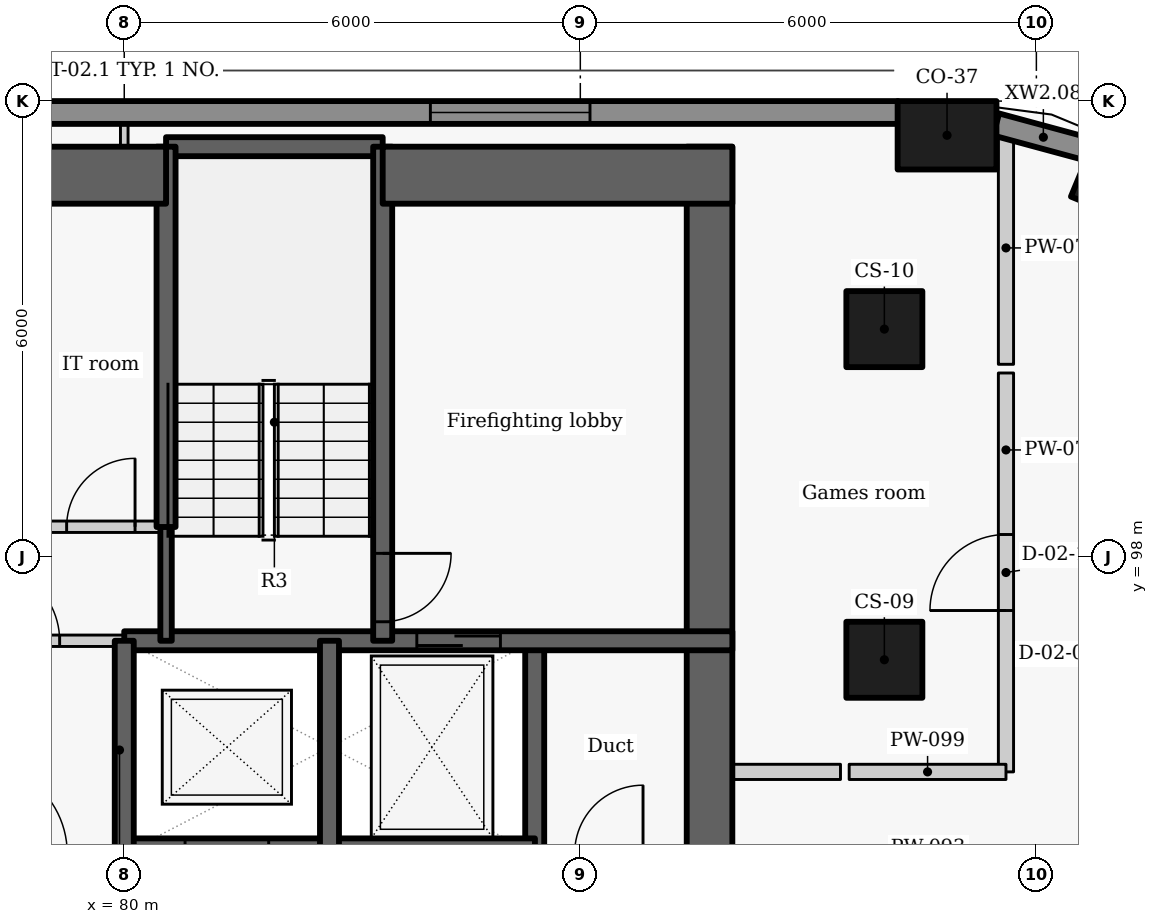
"""IFC4 building model, lengths in metres.
Left out: names, types, materials, properties, quantities, classifications, styles, units other than length and angle.
Written with IfcOpenShell. Run it as: python <this file> out.ifc"""

import sys

from ifc_helpers import new_model, si_unit, direction, frame, frame_2d, origin, origin_2d, place, context, subcontext, project, spatial, rectangle, extrude, element, fill, save


model = new_model("IFC4")
c1 = context("Model", 3, precision=1e-05, world=origin(), true_north=direction((0.0, 1.0)))
c2 = subcontext(c1, "Body", "Model", "MODEL_VIEW")
j1 = project(units=[si_unit("LENGTHUNIT", "METRE"), si_unit("PLANEANGLEUNIT", "RADIAN")], contexts=[c1])
p1 = place(None, origin())
s1 = spatial("IfcSite", under=j1, at=p1, CompositionType="ELEMENT")
p2 = place(p1, origin())
s2 = spatial("IfcBuilding", under=s1, at=p2, CompositionType="ELEMENT")
p3 = place(p2, frame((0.0, 0.0, 140.4)))
s3 = spatial("IfcBuildingStorey", under=s2, at=p3, CompositionType="ELEMENT", Elevation=140.4)
for number, where, z_axis, x_axis in (
    (1, (93.227, 102.91, 0.0), (0.0, 0.0, 1.0), (-0.924, 0.383, 0.0)),
    (2, (90.825, 103.55, 0.0), (0.0, 0.0, 1.0), (-1.0, 0.0, 0.0)),
):
    element("IfcColumn", number, at=place(p3, frame(where, z_axis=z_axis, x_axis=x_axis)), inside=s3, PredefinedType="COLUMN", context=c2, shape_type="SweptSolid", body=[
        extrude(rectangle(XDim=1.3, YDim=0.9, at=origin_2d()), origin(), (0.0, 0.0, 1.0), 3.3),
    ])
for number, where, z_axis, x_axis in (
    (3, (90.0, 96.65, 0.0), (0.0, 0.0, 1.0), (0.0, 1.0, 0.0)),
    (4, (90.0, 101.0, 0.0), (0.0, 0.0, 1.0), (0.0, 1.0, 0.0)),
):
    element("IfcColumn", number, at=place(p3, frame(where, z_axis=z_axis, x_axis=x_axis)), inside=s3, PredefinedType="COLUMN", context=c2, shape_type="SweptSolid", body=[
        extrude(rectangle(XDim=1.0, YDim=1.0, at=origin_2d()), origin(), (0.0, 0.0, 1.0), 3.3),
    ])
p4 = place(p3, frame((92.713, 103.356, 0.0), z_axis=(0.0, 0.0, 1.0), x_axis=(-0.965274225809, 0.26123872031, 0.0)))
e5 = element("IfcWall", 5, at=p4, inside=s3, PredefinedType="SOLIDWALL", context=c2, shape_type="SweptSolid", body=[
    extrude(rectangle(XDim=1.287, YDim=0.3, at=frame_2d((0.644, 0.0))), origin(), (0.0, 0.0, 1.0), 2.425),
])
p5 = place(p3, frame((90.179, 103.85, 0.0), z_axis=(0.0, 0.0, 1.0), x_axis=(-1.0, 0.0, 0.0)))
e6 = element("IfcWall", 6, at=p5, inside=s3, PredefinedType="SOLIDWALL", context=c2, shape_type="SweptSolid", body=[
    extrude(rectangle(XDim=20.391, YDim=0.3, at=frame_2d((10.196, 0.0))), origin(), (0.0, 0.0, 1.0), 2.425),
])
p6 = place(p5, frame((4.051, 0.0, 0.9)))
e7 = element("IfcOpeningElement", 7, at=p6, cuts=e6, PredefinedType="OPENING", context=c2, shape_type="SweptSolid", body=[
    extrude(rectangle(XDim=2.1, YDim=1.1, at=frame_2d((1.05, 0.55))), frame((0.0, 0.16, 0.0), z_axis=(0.0, -1.0, 0.0), x_axis=(1.0, 0.0, 0.0)), (0.0, 0.0, 1.0), 0.32),
])
p7 = place(p5, frame((14.212, 0.0, 0.9)))
e8 = element("IfcOpeningElement", 8, at=p7, cuts=e6, PredefinedType="OPENING", context=c2, shape_type="SweptSolid", body=[
    extrude(rectangle(XDim=2.1, YDim=1.1, at=frame_2d((1.05, 0.55))), frame((0.0, 0.16, 0.0), z_axis=(0.0, -1.0, 0.0), x_axis=(1.0, 0.0, 0.0)), (0.0, 0.0, 1.0), 0.32),
])
p8 = place(p3, frame((85.4, 94.1, -0.275), z_axis=(0.0, 0.0, 1.0), x_axis=(0.0, 1.0, 0.0)))
e9 = element("IfcWall", 9, at=p8, inside=s3, PredefinedType="SHEAR", context=c2, shape_type="SweptSolid", body=[
    extrude(rectangle(XDim=2.8, YDim=0.25, at=frame_2d((1.4, 0.0))), origin(), (0.0, 0.0, 1.0), 3.3),
])
p9 = place(p3, frame((87.7, 103.4, -0.275), z_axis=(0.0, 0.0, 1.0), x_axis=(0.0, -1.0, 0.0)))
e10 = element("IfcWall", 10, at=p9, inside=s3, PredefinedType="SHEAR", context=c2, shape_type="SweptSolid", body=[
    extrude(rectangle(XDim=15.6, YDim=0.6, at=frame_2d((7.8, 0.0))), origin(), (0.0, 0.0, 1.0), 3.3),
])
p10 = place(p9, frame((10.248, 0.0, 0.275)))
e11 = element("IfcOpeningElement", 11, at=p10, cuts=e10, PredefinedType="OPENING", context=c2, shape_type="SweptSolid", body=[
    extrude(rectangle(XDim=1.5, YDim=2.1, at=frame_2d((0.75, 1.05))), frame((0.0, 0.31, 0.0), z_axis=(0.0, -1.0, 0.0), x_axis=(1.0, 0.0, 0.0)), (0.0, 0.0, 1.0), 0.62),
])
p11 = place(p3, frame((79.997, 94.1, -0.275), z_axis=(0.0, 0.0, 1.0), x_axis=(1.0, 0.0, 0.0)))
e12 = element("IfcWall", 12, at=p11, inside=s3, PredefinedType="SHEAR", context=c2, shape_type="SweptSolid", body=[
    extrude(rectangle(XDim=5.406, YDim=0.4, at=frame_2d((2.703, 0.0))), origin(), (0.0, 0.0, 1.0), 3.3),
])
p12 = place(p11, frame((0.803, 0.0, 0.275)))
e13 = element("IfcOpeningElement", 13, at=p12, cuts=e12, PredefinedType="OPENING", context=c2, shape_type="SweptSolid", body=[
    extrude(rectangle(XDim=1.1, YDim=2.1, at=frame_2d((0.55, 1.05))), frame((0.0, 0.21, 0.0), z_axis=(0.0, -1.0, 0.0), x_axis=(1.0, 0.0, 0.0)), (0.0, 0.0, 1.0), 0.42),
])
p13 = place(p3, frame((80.0, 96.9, -0.275), z_axis=(0.0, 0.0, 1.0), x_axis=(1.0, 0.0, 0.0)))
e14 = element("IfcWall", 14, at=p13, inside=s3, PredefinedType="SHEAR", context=c2, shape_type="SweptSolid", body=[
    extrude(rectangle(XDim=8.0, YDim=0.25, at=frame_2d((4.0, 0.0))), origin(), (0.0, 0.0, 1.0), 3.3),
])
p14 = place(p13, frame((3.849, 0.0, 0.275)))
e15 = element("IfcOpeningElement", 15, at=p14, cuts=e14, PredefinedType="OPENING", context=c2, shape_type="SweptSolid", body=[
    extrude(rectangle(XDim=1.1, YDim=2.1, at=frame_2d((0.55, 1.05))), frame((0.0, 0.135, 0.0), z_axis=(0.0, -1.0, 0.0), x_axis=(1.0, 0.0, 0.0)), (0.0, 0.0, 1.0), 0.27),
])
p15 = place(p3, frame((80.0, 94.1, -0.275), z_axis=(0.0, 0.0, 1.0), x_axis=(0.0, 1.0, 0.0)))
e16 = element("IfcWall", 16, at=p15, inside=s3, PredefinedType="SHEAR", context=c2, shape_type="SweptSolid", body=[
    extrude(rectangle(XDim=2.8, YDim=0.25, at=frame_2d((1.4, 0.0))), origin(), (0.0, 0.0, 1.0), 3.3),
])
p16 = place(p3, frame((77.3, 96.9, 0.0), z_axis=(0.0, 0.0, 1.0), x_axis=(1.0, 0.0, 0.0)))
e17 = element("IfcWall", 17, at=p16, inside=s3, PredefinedType="PARTITIONING", context=c2, shape_type="SweptSolid", body=[
    extrude(rectangle(XDim=2.7, YDim=0.15, at=frame_2d((1.35, 0.0))), origin(), (0.0, 0.0, 1.0), 3.025),
])
p17 = place(p16, frame((0.85, 0.0, 0.0)))
e18 = element("IfcOpeningElement", 18, at=p17, cuts=e17, PredefinedType="OPENING", context=c2, shape_type="SweptSolid", body=[
    extrude(rectangle(XDim=1.0, YDim=2.1, at=frame_2d((0.5, 1.05))), frame((0.0, 0.085, 0.0), z_axis=(0.0, -1.0, 0.0), x_axis=(1.0, 0.0, 0.0)), (0.0, 0.0, 1.0), 0.17),
])
p18 = place(p3, frame((82.7, 94.1, -0.275), z_axis=(0.0, 0.0, 1.0), x_axis=(0.0, 1.0, 0.0)))
e19 = element("IfcWall", 19, at=p18, inside=s3, PredefinedType="SHEAR", context=c2, shape_type="SweptSolid", body=[
    extrude(rectangle(XDim=2.8, YDim=0.25, at=frame_2d((1.4, 0.0))), origin(), (0.0, 0.0, 1.0), 3.3),
])
p19 = place(p3, frame((80.55, 103.4, -0.275), z_axis=(0.0, 0.0, 1.0), x_axis=(1.0, 0.0, 0.0)))
e20 = element("IfcWall", 20, at=p19, inside=s3, PredefinedType="SHEAR", context=c2, shape_type="SweptSolid", body=[
    extrude(rectangle(XDim=2.85, YDim=0.25, at=frame_2d((1.425, 0.0))), origin(), (0.0, 0.0, 1.0), 3.3),
])
p20 = place(p3, frame((83.4, 103.4, -0.275), z_axis=(0.0, 0.0, 1.0), x_axis=(0.0, -1.0, 0.0)))
e21 = element("IfcWall", 21, at=p20, inside=s3, PredefinedType="SHEAR", context=c2, shape_type="SweptSolid", body=[
    extrude(rectangle(XDim=6.5, YDim=0.25, at=frame_2d((3.25, 0.0))), origin(), (0.0, 0.0, 1.0), 3.3),
])
p21 = place(p20, frame((5.35, 0.0, 0.275)))
e22 = element("IfcOpeningElement", 22, at=p21, cuts=e21, PredefinedType="OPENING", context=c2, shape_type="SweptSolid", body=[
    extrude(rectangle(XDim=0.9, YDim=2.1, at=frame_2d((0.45, 1.05))), frame((0.0, 0.135, 0.0), z_axis=(0.0, -1.0, 0.0), x_axis=(1.0, 0.0, 0.0)), (0.0, 0.0, 1.0), 0.27),
])
p22 = place(p3, frame((80.55, 96.9, -0.275), z_axis=(0.0, 0.0, 1.0), x_axis=(0.0, 1.0, 0.0)))
e23 = element("IfcWall", 23, at=p22, inside=s3, PredefinedType="SHEAR", context=c2, shape_type="SweptSolid", body=[
    extrude(rectangle(XDim=1.503, YDim=0.15, at=frame_2d((0.751, 0.0))), origin(), (0.0, 0.0, 1.0), 3.3),
])
p23 = place(p3, frame((80.55, 98.397, -0.275), z_axis=(0.0, 0.0, 1.0), x_axis=(0.0, 1.0, 0.0)))
e24 = element("IfcWall", 24, at=p23, inside=s3, PredefinedType="SHEAR", context=c2, shape_type="SweptSolid", body=[
    extrude(rectangle(XDim=5.003, YDim=0.25, at=frame_2d((2.501, 0.0))), origin(), (0.0, 0.0, 1.0), 3.3),
])
p24 = place(p3, frame((75.35, 103.025, -0.275), z_axis=(0.0, 0.0, 1.0), x_axis=(1.0, 0.0, 0.0)))
e25 = element("IfcWall", 25, at=p24, inside=s3, PredefinedType="SHEAR", context=c2, shape_type="SweptSolid", body=[
    extrude(rectangle(XDim=5.2, YDim=0.75, at=frame_2d((2.6, 0.0))), origin(), (0.0, 0.0, 1.0), 3.3),
])
p25 = place(p3, frame((83.4, 103.025, -0.275), z_axis=(0.0, 0.0, 1.0), x_axis=(1.0, 0.0, 0.0)))
e26 = element("IfcWall", 26, at=p25, inside=s3, PredefinedType="SHEAR", context=c2, shape_type="SweptSolid", body=[
    extrude(rectangle(XDim=4.6, YDim=0.75, at=frame_2d((2.3, 0.0))), origin(), (0.0, 0.0, 1.0), 3.3),
])
p26 = place(p3, frame((75.35, 98.4, 0.0), z_axis=(0.0, 0.0, 1.0), x_axis=(1.0, 0.0, 0.0)))
e27 = element("IfcWall", 27, at=p26, inside=s3, PredefinedType="PARTITIONING", context=c2, shape_type="SweptSolid", body=[
    extrude(rectangle(XDim=5.2, YDim=0.15, at=frame_2d((2.6, 0.0))), origin(), (0.0, 0.0, 1.0), 3.025),
])
p27 = place(p26, frame((0.434, 0.0, 0.0)))
e28 = element("IfcOpeningElement", 28, at=p27, cuts=e27, PredefinedType="OPENING", context=c2, shape_type="SweptSolid", body=[
    extrude(rectangle(XDim=0.9, YDim=2.1, at=frame_2d((0.45, 1.05))), frame((0.0, 0.085, 0.0), z_axis=(0.0, -1.0, 0.0), x_axis=(1.0, 0.0, 0.0)), (0.0, 0.0, 1.0), 0.17),
])
p28 = place(p26, frame((2.176, 0.0, 0.0)))
e29 = element("IfcOpeningElement", 29, at=p28, cuts=e27, PredefinedType="OPENING", context=c2, shape_type="SweptSolid", body=[
    extrude(rectangle(XDim=0.9, YDim=2.1, at=frame_2d((0.45, 1.05))), frame((0.0, 0.085, 0.0), z_axis=(0.0, -1.0, 0.0), x_axis=(1.0, 0.0, 0.0)), (0.0, 0.0, 1.0), 0.17),
])
p29 = place(p26, frame((3.892, 0.0, 0.0)))
e30 = element("IfcOpeningElement", 30, at=p29, cuts=e27, PredefinedType="OPENING", context=c2, shape_type="SweptSolid", body=[
    extrude(rectangle(XDim=0.9, YDim=2.1, at=frame_2d((0.45, 1.05))), frame((0.0, 0.085, 0.0), z_axis=(0.0, -1.0, 0.0), x_axis=(1.0, 0.0, 0.0)), (0.0, 0.0, 1.0), 0.17),
])
p30 = place(p3, frame((91.6, 95.175, 0.0), z_axis=(0.0, 0.0, 1.0), x_axis=(0.0, 1.0, 0.0)))
e31 = element("IfcWall", 31, at=p30, inside=s3, PredefinedType="PARTITIONING", context=c2, shape_type="SweptSolid", body=[
    extrude(rectangle(XDim=5.248, YDim=0.2, at=frame_2d((2.624, 0.0))), origin(), (0.0, 0.0, 1.0), 3.025),
])
p31 = place(p30, frame((2.123, 0.0, 0.0)))
e32 = element("IfcOpeningElement", 32, at=p31, cuts=e31, PredefinedType="OPENING", context=c2, shape_type="SweptSolid", body=[
    extrude(rectangle(XDim=1.0, YDim=2.1, at=frame_2d((0.5, 1.05))), frame((0.0, 0.11, 0.0), z_axis=(0.0, -1.0, 0.0), x_axis=(1.0, 0.0, 0.0)), (0.0, 0.0, 1.0), 0.22),
])
p32 = place(p3, frame((91.6, 100.537, 0.0), z_axis=(0.0, 0.0, 1.0), x_axis=(0.0, 1.0, 0.0)))
e33 = element("IfcWall", 33, at=p32, inside=s3, PredefinedType="PARTITIONING", context=c2, shape_type="SweptSolid", body=[
    extrude(rectangle(XDim=3.062, YDim=0.2, at=frame_2d((1.531, 0.0))), origin(), (0.0, 0.0, 1.0), 2.405),
])
p33 = place(p3, frame((88.0, 95.175, 0.0), z_axis=(0.0, 0.0, 1.0), x_axis=(1.0, 0.0, 0.0)))
e34 = element("IfcWall", 34, at=p33, inside=s3, PredefinedType="PARTITIONING", context=c2, shape_type="SweptSolid", body=[
    extrude(rectangle(XDim=1.423, YDim=0.2, at=frame_2d((0.711, 0.0))), origin(), (0.0, 0.0, 1.0), 3.025),
])
p34 = place(p3, frame((89.537, 95.175, 0.0), z_axis=(0.0, 0.0, 1.0), x_axis=(1.0, 0.0, 0.0)))
e35 = element("IfcWall", 35, at=p34, inside=s3, PredefinedType="PARTITIONING", context=c2, shape_type="SweptSolid", body=[
    extrude(rectangle(XDim=2.063, YDim=0.2, at=frame_2d((1.031, 0.0))), origin(), (0.0, 0.0, 1.0), 2.505),
])
p35 = place(p3, frame((80.0, 103.4, 0.0), z_axis=(0.0, 0.0, 1.0), x_axis=(0.0, 1.0, 0.0)))
e36 = element("IfcWall", 36, at=p35, inside=s3, PredefinedType="PARTITIONING", context=c2, shape_type="SweptSolid", body=[
    extrude(rectangle(XDim=0.3, YDim=0.1, at=frame_2d((0.15, 0.0))), origin(), (0.0, 0.0, 1.0), 3.025),
])
p36 = place(p6, origin())
e37 = element("IfcWindow", 37, at=p36, inside=s3, PartitioningType="SINGLE_PANEL", PredefinedType="WINDOW", context=c2, shape_type="SweptSolid", body=[
    extrude(rectangle(XDim=2.1, YDim=1.1, at=frame_2d((1.05, 0.55))), frame((0.0, 0.03, 0.0), z_axis=(0.0, -1.0, 0.0), x_axis=(1.0, 0.0, 0.0)), (0.0, 0.0, 1.0), 0.06),
])
fill(e7, e37)
p37 = place(p14, origin())
e38 = element("IfcDoor", 38, at=p37, inside=s3, OperationType="SLIDING_TO_LEFT", PredefinedType="DOOR", context=c2, shape_type="SweptSolid", body=[
    extrude(rectangle(XDim=1.1, YDim=2.1, at=frame_2d((0.55, 1.05))), frame((0.0, 0.025, 0.0), z_axis=(0.0, -1.0, 0.0), x_axis=(1.0, 0.0, 0.0)), (0.0, 0.0, 1.0), 0.05),
])
fill(e15, e38)
p38 = place(p17, origin())
e39 = element("IfcDoor", 39, at=p38, inside=s3, OperationType="SINGLE_SWING_LEFT", PredefinedType="DOOR", context=c2, shape_type="SweptSolid", body=[
    extrude(rectangle(XDim=1.0, YDim=2.1, at=frame_2d((0.5, 1.05))), frame((0.0, 0.025, 0.0), z_axis=(0.0, -1.0, 0.0), x_axis=(1.0, 0.0, 0.0)), (0.0, 0.0, 1.0), 0.05),
])
fill(e18, e39)
p39 = place(p29, origin())
e40 = element("IfcDoor", 40, at=p39, inside=s3, OperationType="SINGLE_SWING_RIGHT", PredefinedType="DOOR", context=c2, shape_type="SweptSolid", body=[
    extrude(rectangle(XDim=0.9, YDim=2.1, at=frame_2d((0.45, 1.05))), frame((0.0, 0.025, 0.0), z_axis=(0.0, -1.0, 0.0), x_axis=(1.0, 0.0, 0.0)), (0.0, 0.0, 1.0), 0.05),
])
fill(e30, e40)
p40 = place(p21, origin())
e41 = element("IfcDoor", 41, at=p40, inside=s3, OperationType="SINGLE_SWING_LEFT", PredefinedType="DOOR", context=c2, shape_type="SweptSolid", body=[
    extrude(rectangle(XDim=0.9, YDim=2.1, at=frame_2d((0.45, 1.05))), frame((0.0, 0.025, 0.0), z_axis=(0.0, -1.0, 0.0), x_axis=(1.0, 0.0, 0.0)), (0.0, 0.0, 1.0), 0.05),
])
fill(e22, e41)
p41 = place(p31, origin())
e42 = element("IfcDoor", 42, at=p41, inside=s3, OperationType="SINGLE_SWING_LEFT", PredefinedType="DOOR", context=c2, shape_type="SweptSolid", body=[
    extrude(rectangle(XDim=1.0, YDim=2.1, at=frame_2d((0.5, 1.05))), frame((0.0, 0.025, 0.0), z_axis=(0.0, -1.0, 0.0), x_axis=(1.0, 0.0, 0.0)), (0.0, 0.0, 1.0), 0.05),
])
fill(e32, e42)
save(model, sys.argv[1])
